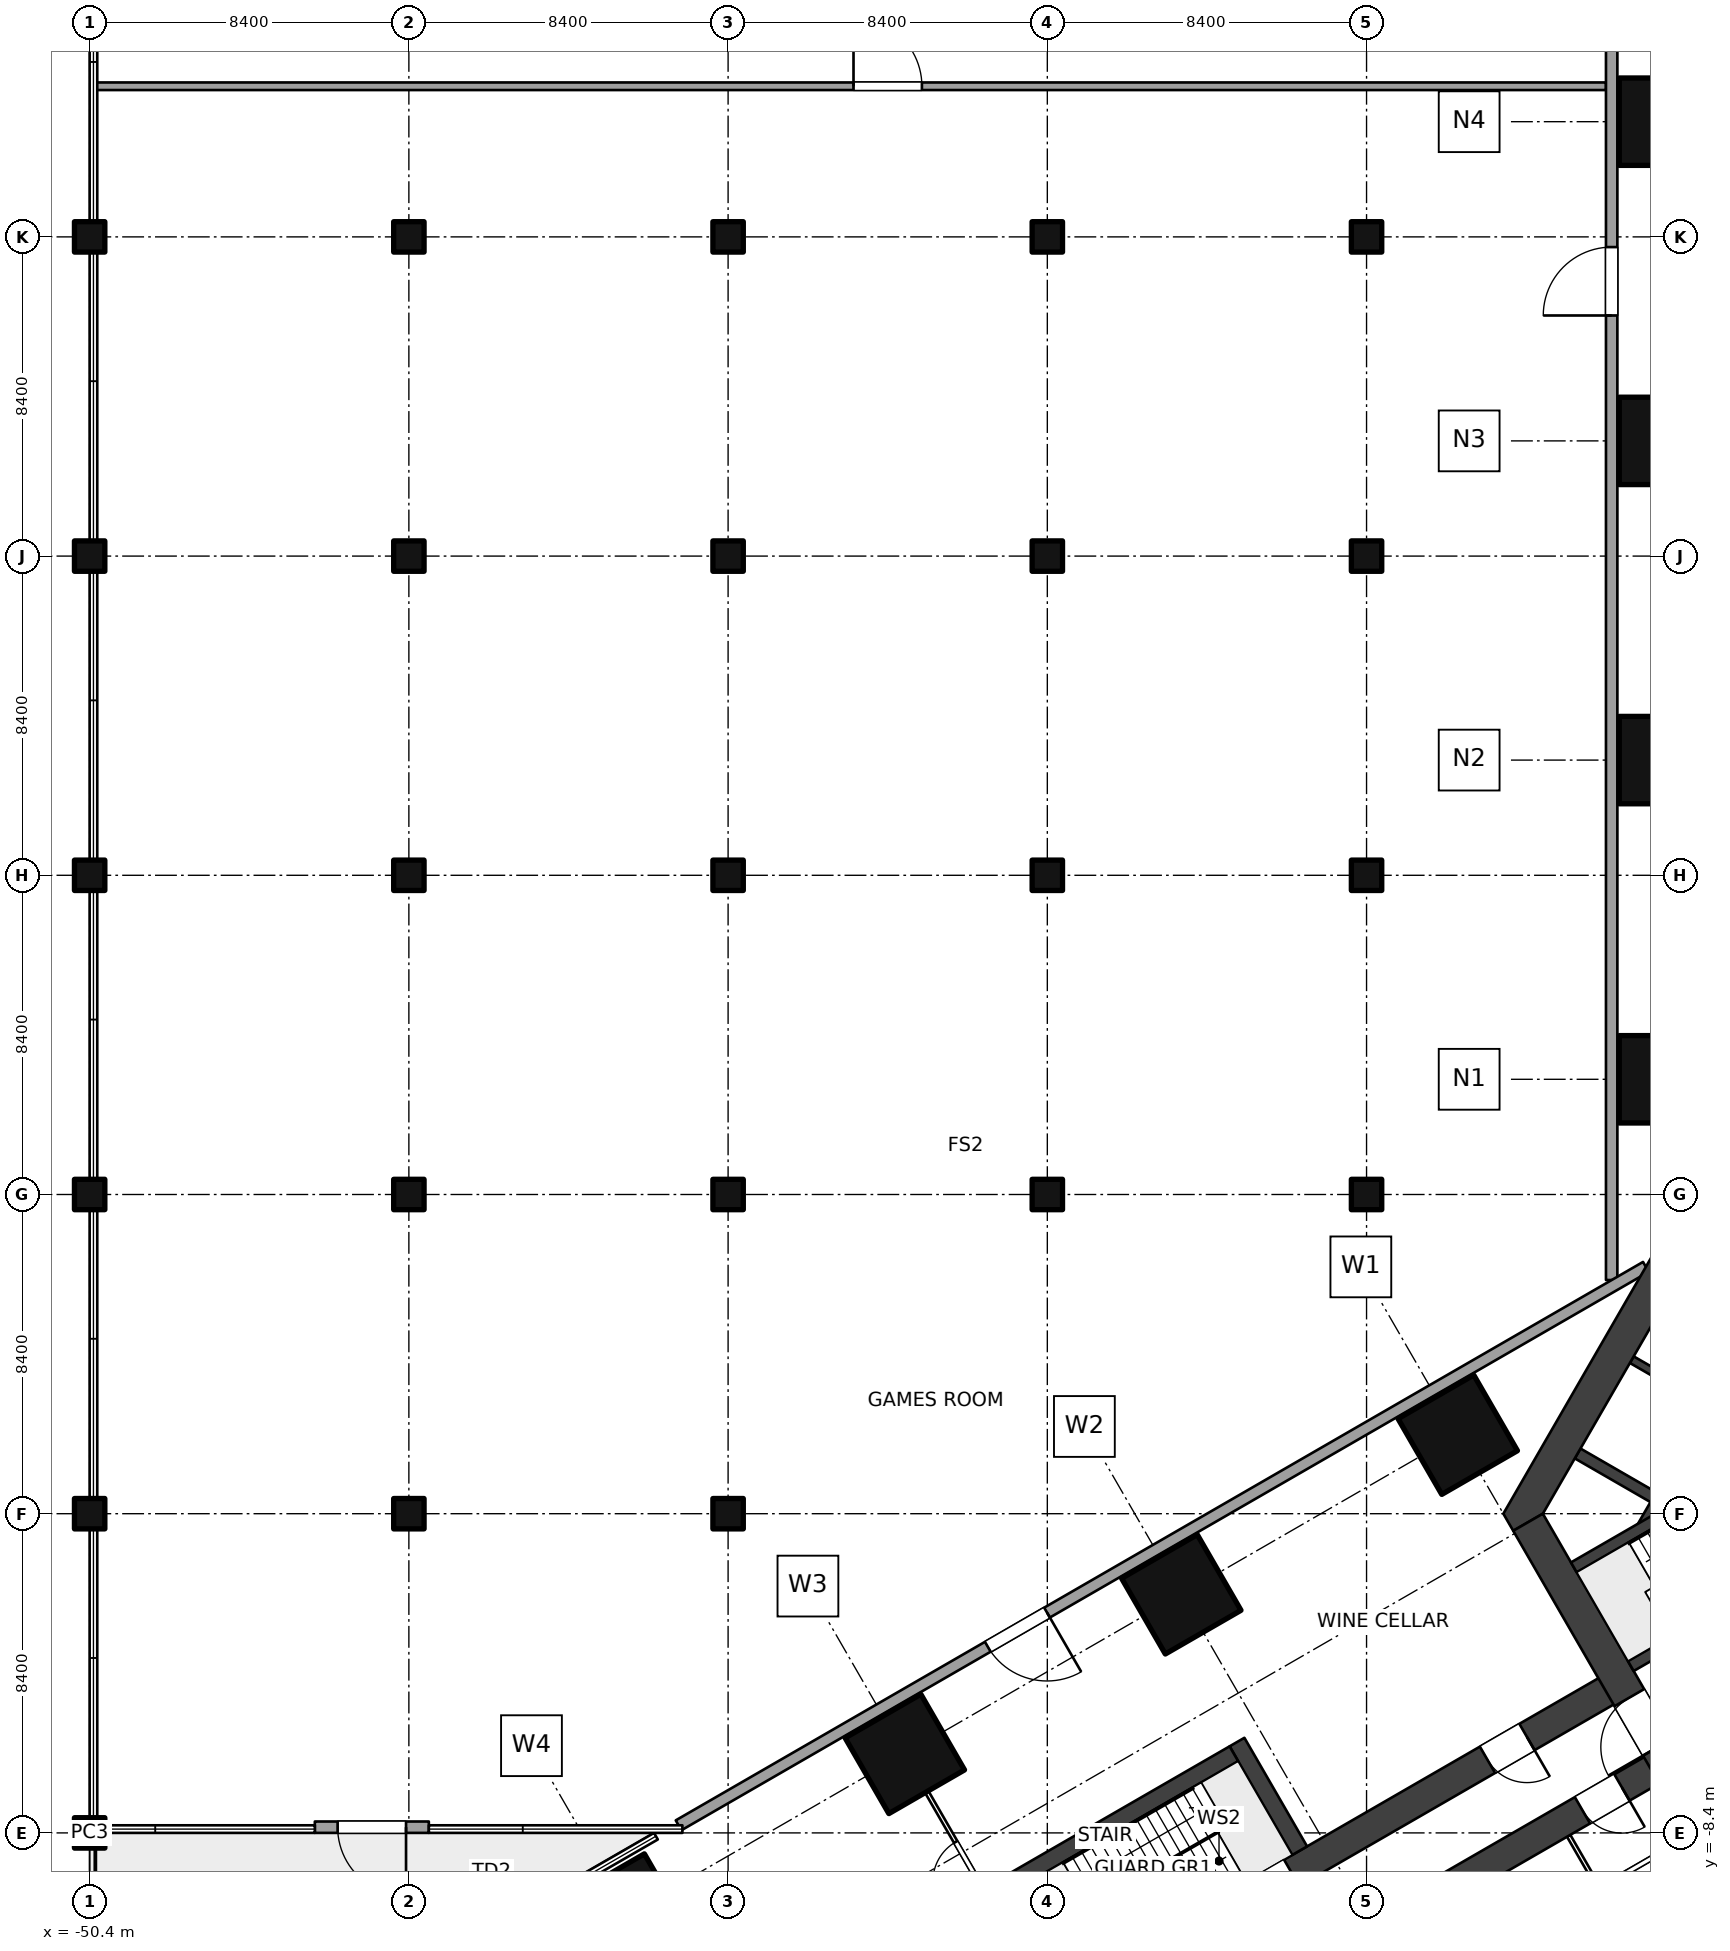
"""IFC4 building model, lengths in metres.
Left out: names, types, materials, properties, quantities, classifications, styles, units other than length and angle.
Written with IfcOpenShell. Run it as: python <this file> out.ifc"""

import sys

from ifc_helpers import new_model, si_unit, direction, frame, frame_2d, origin, origin_2d, place, context, subcontext, project, spatial, polyline, rectangle, outline, extrude, element, fill, save


model = new_model("IFC4")
c1 = context("Model", 3, precision=1e-05, world=origin(), true_north=direction((0.0, 1.0)))
c2 = subcontext(c1, "Body", "Model", "MODEL_VIEW")
j1 = project(units=[si_unit("LENGTHUNIT", "METRE"), si_unit("PLANEANGLEUNIT", "RADIAN")], contexts=[c1])
p1 = place(None, origin())
s1 = spatial("IfcSite", under=j1, at=p1, CompositionType="ELEMENT")
p2 = place(p1, origin())
s2 = spatial("IfcBuilding", under=s1, at=p2, CompositionType="ELEMENT")
p3 = place(p2, frame((0.0, 0.0, 21.0)))
s3 = spatial("IfcBuildingStorey", under=s2, at=p3, CompositionType="ELEMENT", Elevation=21.0)
for number, where, z_axis, x_axis in (
    (1, (-9.0, 11.432, 0.0), (0.0, 0.0, 1.0), (1.0, 0.0, 0.0)),
    (2, (-9.0, 19.832, 0.0), (0.0, 0.0, 1.0), (1.0, 0.0, 0.0)),
    (3, (-9.0, 28.231, 0.0), (0.0, 0.0, 1.0), (1.0, 0.0, 0.0)),
    (4, (-9.0, 36.632, 0.0), (0.0, 0.0, 1.0), (1.0, 0.0, 0.0)),
    (5, (-14.4, 2.078, 0.0), (0.0, 0.0, 1.0), (-0.5, 0.866, 0.0)),
    (6, (-21.675, -2.122, 0.0), (0.0, 0.0, 1.0), (-0.5, 0.866, 0.0)),
    (7, (-28.949, -6.322, 0.0), (0.0, 0.0, 1.0), (-0.5, 0.866, 0.0)),
    (8, (-36.224, -10.521, 0.0), (0.0, 0.0, 1.0), (-0.5, 0.866, 0.0)),
):
    element("IfcColumn", number, at=place(p3, frame(where, z_axis=z_axis, x_axis=x_axis)), inside=s3, PredefinedType="COLUMN", context=c2, shape_type="SweptSolid", body=[
        extrude(rectangle(XDim=2.3, YDim=2.3, at=origin_2d()), origin(), (0.0, 0.0, 1.0), 5.0),
    ])
for number, where, z_axis, x_axis in (
    (9, (-50.4, -8.4, 0.0), (0.0, 0.0, 1.0), (1.0, 0.0, 0.0)),
    (10, (-50.4, 0.0, 0.0), (0.0, 0.0, 1.0), (1.0, 0.0, 0.0)),
    (11, (-50.4, 8.4, 0.0), (0.0, 0.0, 1.0), (1.0, 0.0, 0.0)),
    (12, (-50.4, 16.8, 0.0), (0.0, 0.0, 1.0), (1.0, 0.0, 0.0)),
    (13, (-50.4, 25.2, 0.0), (0.0, 0.0, 1.0), (1.0, 0.0, 0.0)),
    (14, (-50.4, 33.6, 0.0), (0.0, 0.0, 1.0), (1.0, 0.0, 0.0)),
    (15, (-42.0, 0.0, 0.0), (0.0, 0.0, 1.0), (1.0, 0.0, 0.0)),
    (16, (-42.0, 8.4, 0.0), (0.0, 0.0, 1.0), (1.0, 0.0, 0.0)),
    (17, (-42.0, 16.8, 0.0), (0.0, 0.0, 1.0), (1.0, 0.0, 0.0)),
    (18, (-42.0, 25.2, 0.0), (0.0, 0.0, 1.0), (1.0, 0.0, 0.0)),
    (19, (-42.0, 33.6, 0.0), (0.0, 0.0, 1.0), (1.0, 0.0, 0.0)),
    (20, (-33.6, 0.0, 0.0), (0.0, 0.0, 1.0), (1.0, 0.0, 0.0)),
    (21, (-33.6, 8.4, 0.0), (0.0, 0.0, 1.0), (1.0, 0.0, 0.0)),
    (22, (-33.6, 16.8, 0.0), (0.0, 0.0, 1.0), (1.0, 0.0, 0.0)),
    (23, (-33.6, 25.2, 0.0), (0.0, 0.0, 1.0), (1.0, 0.0, 0.0)),
    (24, (-33.6, 33.6, 0.0), (0.0, 0.0, 1.0), (1.0, 0.0, 0.0)),
    (25, (-25.2, 8.4, 0.0), (0.0, 0.0, 1.0), (1.0, 0.0, 0.0)),
    (26, (-25.2, 16.8, 0.0), (0.0, 0.0, 1.0), (1.0, 0.0, 0.0)),
    (27, (-25.2, 25.2, 0.0), (0.0, 0.0, 1.0), (1.0, 0.0, 0.0)),
    (28, (-25.2, 33.6, 0.0), (0.0, 0.0, 1.0), (1.0, 0.0, 0.0)),
    (29, (-16.8, 8.4, 0.0), (0.0, 0.0, 1.0), (1.0, 0.0, 0.0)),
    (30, (-16.8, 16.8, 0.0), (0.0, 0.0, 1.0), (1.0, 0.0, 0.0)),
    (31, (-16.8, 25.2, 0.0), (0.0, 0.0, 1.0), (1.0, 0.0, 0.0)),
    (32, (-16.8, 33.6, 0.0), (0.0, 0.0, 1.0), (1.0, 0.0, 0.0)),
):
    element("IfcColumn", number, at=place(p3, frame(where, z_axis=z_axis, x_axis=x_axis)), inside=s3, PredefinedType="COLUMN", context=c2, shape_type="SweptSolid", body=[
        extrude(rectangle(XDim=0.8, YDim=0.8, at=origin_2d()), origin(), (0.0, 0.0, 1.0), 5.0),
    ])
p4 = place(p3, frame((-6.47, -10.757, 0.0), z_axis=(0.0, 0.0, 1.0), x_axis=(-0.499997612506, 0.8660267822, 0.0)))
e33 = element("IfcWall", 33, at=p4, inside=s3, PredefinedType="SHEAR", context=c2, shape_type="SweptSolid", body=[
    extrude(rectangle(XDim=12.161, YDim=0.9, at=frame_2d((6.08, 0.0))), origin(), (0.0, 0.0, 1.0), 5.0),
])
p5 = place(p4, frame((5.33, 0.0, 0.0)))
e34 = element("IfcOpeningElement", 34, at=p5, cuts=e33, PredefinedType="OPENING", context=c2, shape_type="SweptSolid", body=[
    extrude(rectangle(XDim=1.5, YDim=2.1, at=frame_2d((0.75, 1.05))), frame((0.0, 0.46, 0.0), z_axis=(0.0, -1.0, 0.0), x_axis=(1.0, 0.0, 0.0)), (0.0, 0.0, 1.0), 0.92),
])
p6 = place(p3, origin())
e35 = element("IfcWall", 35, at=p6, inside=s3, PredefinedType="SHEAR", context=c2, shape_type="SweptSolid", body=[
    extrude(outline(polyline([(-6.6, 11.432), (-13.2, 0.0), (-12.94, -0.45), (-12.161, 0.0), (-6.08, 10.531), (-6.08, 11.432), (-6.6, 11.432)])), origin(), (0.0, 0.0, 1.0), 5.0),
])
p7 = place(p3, frame((-3.869, -0.559, 0.0), z_axis=(0.0, 0.0, 1.0), x_axis=(-0.86602711848, -0.499997030048, 0.0)))
e36 = element("IfcWall", 36, at=p7, inside=s3, PredefinedType="SHEAR", context=c2, shape_type="SweptSolid", body=[
    extrude(rectangle(XDim=6.901, YDim=0.3, at=frame_2d((3.451, 0.0))), origin(), (0.0, 0.0, 1.0), 5.0),
])
p8 = place(p7, frame((0.25, 0.0, 0.0)))
e37 = element("IfcOpeningElement", 37, at=p8, cuts=e36, PredefinedType="OPENING", context=c2, shape_type="SweptSolid", body=[
    extrude(rectangle(XDim=1.0, YDim=2.1, at=frame_2d((0.5, 1.05))), frame((0.0, 0.16, 0.0), z_axis=(0.0, -1.0, 0.0), x_axis=(1.0, 0.0, 0.0)), (0.0, 0.0, 1.0), 0.32),
])
p9 = place(p3, frame((-5.369, 2.039, 0.0), z_axis=(0.0, 0.0, 1.0), x_axis=(-0.86602711848, -0.499997030048, 0.0)))
e38 = element("IfcWall", 38, at=p9, inside=s3, PredefinedType="SHEAR", context=c2, shape_type="SweptSolid", body=[
    extrude(rectangle(XDim=6.901, YDim=0.3, at=frame_2d((3.451, 0.0))), origin(), (0.0, 0.0, 1.0), 5.0),
])
p10 = place(p3, frame((-9.548, -0.374, 0.0), z_axis=(0.0, 0.0, 1.0), x_axis=(0.500002290144, 0.866024081565, 0.0)))
e39 = element("IfcWall", 39, at=p10, inside=s3, PredefinedType="SHEAR", context=c2, shape_type="SweptSolid", body=[
    extrude(rectangle(XDim=10.195, YDim=0.3, at=frame_2d((5.098, 0.0))), origin(), (0.0, 0.0, 1.0), 5.0),
])
p11 = place(p3, frame((-9.254, 0.435, 0.0), z_axis=(0.0, 0.0, 1.0), x_axis=(-0.866007057882, 0.500031774688, 0.0)))
e40 = element("IfcWall", 40, at=p11, inside=s3, PredefinedType="SHEAR", context=c2, shape_type="SweptSolid", body=[
    extrude(rectangle(XDim=2.3, YDim=0.3, at=frame_2d((1.15, 0.0))), origin(), (0.0, 0.0, 1.0), 5.0),
])
p12 = place(p3, frame((-7.829, 2.903, 0.0), z_axis=(0.0, 0.0, 1.0), x_axis=(-0.866053019151, 0.499952165731, 0.0)))
e41 = element("IfcWall", 41, at=p12, inside=s3, PredefinedType="SHEAR", context=c2, shape_type="SweptSolid", body=[
    extrude(rectangle(XDim=2.3, YDim=0.2, at=frame_2d((1.15, 0.0))), origin(), (0.0, 0.0, 1.0), 5.0),
])
p13 = place(p3, frame((-8.91, -6.53, 0.0), z_axis=(0.0, 0.0, 1.0), x_axis=(-0.866026214035, -0.499998596603, 0.0)))
e42 = element("IfcWall", 42, at=p13, inside=s3, PredefinedType="SHEAR", context=c2, shape_type="SweptSolid", body=[
    extrude(rectangle(XDim=36.888, YDim=0.8, at=frame_2d((18.444, 0.0))), origin(), (0.0, 0.0, 1.0), 5.0),
])
p14 = place(p13, frame((1.35, 0.0, 0.0)))
e43 = element("IfcOpeningElement", 43, at=p14, cuts=e42, PredefinedType="OPENING", context=c2, shape_type="SweptSolid", body=[
    extrude(rectangle(XDim=1.2, YDim=2.1, at=frame_2d((0.6, 1.05))), frame((0.0, 0.41, 0.0), z_axis=(0.0, -1.0, 0.0), x_axis=(1.0, 0.0, 0.0)), (0.0, 0.0, 1.0), 0.82),
])
p15 = place(p3, frame((-10.11, -4.451, 0.0), z_axis=(0.0, 0.0, 1.0), x_axis=(-0.866023348156, -0.500003560437, 0.0)))
e44 = element("IfcWall", 44, at=p15, inside=s3, PredefinedType="SHEAR", context=c2, shape_type="SweptSolid", body=[
    extrude(rectangle(XDim=36.888, YDim=0.8, at=frame_2d((18.444, 0.0))), origin(), (0.0, 0.0, 1.0), 5.0),
])
p16 = place(p15, frame((10.0, 0.0, 0.0)))
e45 = element("IfcOpeningElement", 45, at=p16, cuts=e44, PredefinedType="OPENING", context=c2, shape_type="SweptSolid", body=[
    extrude(rectangle(XDim=1.0, YDim=2.1, at=frame_2d((0.5, 1.05))), frame((0.0, 0.41, 0.0), z_axis=(0.0, -1.0, 0.0), x_axis=(1.0, 0.0, 0.0)), (0.0, 0.0, 1.0), 0.82),
])
p17 = place(p15, frame((2.85, 0.0, 0.0)))
e46 = element("IfcOpeningElement", 46, at=p17, cuts=e44, PredefinedType="OPENING", context=c2, shape_type="SweptSolid", body=[
    extrude(rectangle(XDim=1.2, YDim=2.1, at=frame_2d((0.6, 1.05))), frame((0.0, 0.41, 0.0), z_axis=(0.0, -1.0, 0.0), x_axis=(1.0, 0.0, 0.0)), (0.0, 0.0, 1.0), 0.82),
])
p18 = place(p3, frame((-41.475, -8.25, 0.0), z_axis=(0.0, 0.0, 1.0), x_axis=(-1.0, 0.0, 0.0)))
e47 = element("IfcWall", 47, at=p18, inside=s3, PredefinedType="SOLIDWALL", context=c2, shape_type="SweptSolid", body=[
    extrude(rectangle(XDim=3.0, YDim=0.3, at=frame_2d((1.5, 0.0))), origin(), (0.0, 0.0, 1.0), 4.6),
])
p19 = place(p18, frame((0.6, 0.0, 0.0)))
e48 = element("IfcOpeningElement", 48, at=p19, cuts=e47, PredefinedType="OPENING", context=c2, shape_type="SweptSolid", body=[
    extrude(rectangle(XDim=1.8, YDim=2.4, at=frame_2d((0.9, 1.2))), frame((0.0, 0.16, 0.0), z_axis=(0.0, -1.0, 0.0), x_axis=(1.0, 0.0, 0.0)), (0.0, 0.0, 1.0), 0.32),
])
p20 = place(p3, frame((-8.3, -8.487, 0.0), z_axis=(0.0, 0.0, 1.0), x_axis=(-0.866034573852, -0.49998411664, 0.0)))
e49 = element("IfcWall", 49, at=p20, inside=s3, PredefinedType="PARTITIONING", context=c2, shape_type="SweptSolid", body=[
    extrude(rectangle(XDim=2.8, YDim=0.1, at=frame_2d((1.4, 0.0))), origin(), (0.0, 0.0, 1.0), 4.6),
])
p21 = place(p20, frame((0.9, 0.0, 0.0)))
e50 = element("IfcOpeningElement", 50, at=p21, cuts=e49, PredefinedType="OPENING", context=c2, shape_type="SweptSolid", body=[
    extrude(rectangle(XDim=1.2, YDim=2.1, at=frame_2d((0.6, 1.05))), frame((0.0, 0.06, 0.0), z_axis=(0.0, -1.0, 0.0), x_axis=(1.0, 0.0, 0.0)), (0.0, 0.0, 1.0), 0.12),
])
p22 = place(p3, frame((-11.482, -8.476, 0.0), z_axis=(0.0, 0.0, 1.0), x_axis=(0.500017819788, -0.86601511528, 0.0)))
e51 = element("IfcWall", 51, at=p22, inside=s3, PredefinedType="PARTITIONING", context=c2, shape_type="SweptSolid", body=[
    extrude(rectangle(XDim=1.55, YDim=0.1, at=frame_2d((0.775, 0.0))), origin(), (0.0, 0.0, 1.0), 4.6),
])
p23 = place(p3, frame((-25.249, -12.73, 0.0), z_axis=(0.0, 0.0, 1.0), x_axis=(-0.499987320047, 0.866032724435, 0.0)))
e52 = element("IfcWall", 52, at=p23, inside=s3, PredefinedType="PARTITIONING", context=c2, shape_type="SweptSolid", body=[
    extrude(rectangle(XDim=6.25, YDim=0.1, at=frame_2d((3.125, 0.0))), origin(), (0.0, 0.0, 1.0), 2.8),
])
p24 = place(p23, frame((3.525, 0.0, 0.0)))
e53 = element("IfcOpeningElement", 53, at=p24, cuts=e52, PredefinedType="OPENING", context=c2, shape_type="SweptSolid", body=[
    extrude(rectangle(XDim=1.2, YDim=2.1, at=frame_2d((0.6, 1.05))), frame((0.0, 0.06, 0.0), z_axis=(0.0, -1.0, 0.0), x_axis=(1.0, 0.0, 0.0)), (0.0, 0.0, 1.0), 0.12),
])
p25 = place(p3, frame((-50.237, 37.564, 0.0), z_axis=(0.0, 0.0, 1.0), x_axis=(1.0, 0.0, 0.0)))
e54 = element("IfcWall", 54, at=p25, inside=s3, PredefinedType="SOLIDWALL", context=c2, shape_type="SweptSolid", body=[
    extrude(rectangle(XDim=39.737, YDim=0.2, at=frame_2d((19.869, 0.0))), origin(), (0.0, 0.0, 1.0), 4.6),
])
p26 = place(p25, frame((19.937, 0.0, 0.0)))
e55 = element("IfcOpeningElement", 55, at=p26, cuts=e54, PredefinedType="OPENING", context=c2, shape_type="SweptSolid", body=[
    extrude(rectangle(XDim=1.8, YDim=2.4, at=frame_2d((0.9, 1.2))), frame((0.0, 0.11, 0.0), z_axis=(0.0, -1.0, 0.0), x_axis=(1.0, 0.0, 0.0)), (0.0, 0.0, 1.0), 0.22),
])
p27 = place(p3, frame((-10.35, 6.149, 0.0), z_axis=(0.0, 0.0, 1.0), x_axis=(0.0, 1.0, 0.0)))
e56 = element("IfcWall", 56, at=p27, inside=s3, PredefinedType="SOLIDWALL", context=c2, shape_type="SweptSolid", body=[
    extrude(rectangle(XDim=41.883, YDim=0.3, at=frame_2d((20.941, 0.0))), origin(), (0.0, 0.0, 1.0), 4.6),
])
p28 = place(p27, frame((25.383, 0.0, 0.0)))
e57 = element("IfcOpeningElement", 57, at=p28, cuts=e56, PredefinedType="OPENING", context=c2, shape_type="SweptSolid", body=[
    extrude(rectangle(XDim=1.8, YDim=2.4, at=frame_2d((0.9, 1.2))), frame((0.0, 0.16, 0.0), z_axis=(0.0, -1.0, 0.0), x_axis=(1.0, 0.0, 0.0)), (0.0, 0.0, 1.0), 0.32),
])
p29 = place(p3, frame((-9.45, 6.495, 0.0), z_axis=(0.0, 0.0, 1.0), x_axis=(-0.866027750123, -0.499995936, 0.0)))
e58 = element("IfcWall", 58, at=p29, inside=s3, PredefinedType="SOLIDWALL", context=c2, shape_type="SweptSolid", body=[
    extrude(rectangle(XDim=29.39, YDim=0.3, at=frame_2d((14.695, 0.0))), origin(), (0.0, 0.0, 1.0), 4.6),
])
p30 = place(p29, frame((18.195, 0.0, 0.0)))
e59 = element("IfcOpeningElement", 59, at=p30, cuts=e58, PredefinedType="OPENING", context=c2, shape_type="SweptSolid", body=[
    extrude(rectangle(XDim=1.8, YDim=2.4, at=frame_2d((0.9, 1.2))), frame((0.0, 0.16, 0.0), z_axis=(0.0, -1.0, 0.0), x_axis=(1.0, 0.0, 0.0)), (0.0, 0.0, 1.0), 0.32),
])
p31 = place(p3, frame((-18.559, -8.868, 0.0), z_axis=(0.0, 0.0, 1.0), x_axis=(-0.50002983664, 0.866008176907, 0.0)))
e60 = element("IfcWall", 60, at=p31, inside=s3, PredefinedType="SOLIDWALL", context=c2, shape_type="SweptSolid", body=[
    extrude(rectangle(XDim=3.3, YDim=0.45, at=frame_2d((1.65, 0.0))), origin(), (0.0, 0.0, 1.0), 5.0),
])
p32 = place(p3, frame((-20.292, -6.317, 0.0), z_axis=(0.0, 0.0, 1.0), x_axis=(-0.866028853923, -0.499994024137, 0.0)))
e61 = element("IfcWall", 61, at=p32, inside=s3, PredefinedType="SOLIDWALL", context=c2, shape_type="SweptSolid", body=[
    extrude(rectangle(XDim=6.9, YDim=0.45, at=frame_2d((3.45, 0.0))), origin(), (0.0, 0.0, 1.0), 5.0),
])
p33 = place(p19, origin())
e62 = element("IfcDoor", 62, at=p33, inside=s3, OperationType="DOUBLE_DOOR_SINGLE_SWING", PredefinedType="DOOR", context=c2, shape_type="SweptSolid", body=[
    extrude(rectangle(XDim=1.8, YDim=2.4, at=frame_2d((0.9, 1.2))), frame((0.0, 0.025, 0.0), z_axis=(0.0, -1.0, 0.0), x_axis=(1.0, 0.0, 0.0)), (0.0, 0.0, 1.0), 0.05),
])
fill(e48, e62)
p34 = place(p5, origin())
e63 = element("IfcDoor", 63, at=p34, inside=s3, OperationType="DOUBLE_DOOR_DOUBLE_SWING", PredefinedType="DOOR", context=c2, shape_type="SweptSolid", body=[
    extrude(rectangle(XDim=1.5, YDim=2.1, at=frame_2d((0.75, 1.05))), frame((0.0, 0.025, 0.0), z_axis=(0.0, -1.0, 0.0), x_axis=(1.0, 0.0, 0.0)), (0.0, 0.0, 1.0), 0.05),
])
fill(e34, e63)
p35 = place(p14, origin())
e64 = element("IfcDoor", 64, at=p35, inside=s3, OperationType="DOUBLE_SWING_LEFT", PredefinedType="DOOR", context=c2, shape_type="SweptSolid", body=[
    extrude(rectangle(XDim=1.2, YDim=2.1, at=frame_2d((0.6, 1.05))), frame((0.0, 0.025, 0.0), z_axis=(0.0, -1.0, 0.0), x_axis=(1.0, 0.0, 0.0)), (0.0, 0.0, 1.0), 0.05),
])
fill(e43, e64)
p36 = place(p21, origin())
e65 = element("IfcDoor", 65, at=p36, inside=s3, OperationType="DOUBLE_SWING_LEFT", PredefinedType="DOOR", context=c2, shape_type="SweptSolid", body=[
    extrude(rectangle(XDim=1.2, YDim=2.1, at=frame_2d((0.6, 1.05))), frame((0.0, 0.025, 0.0), z_axis=(0.0, -1.0, 0.0), x_axis=(1.0, 0.0, 0.0)), (0.0, 0.0, 1.0), 0.05),
])
fill(e50, e65)
p37 = place(p24, origin())
e66 = element("IfcDoor", 66, at=p37, inside=s3, OperationType="DOUBLE_SWING_LEFT", PredefinedType="DOOR", context=c2, shape_type="SweptSolid", body=[
    extrude(rectangle(XDim=1.2, YDim=2.1, at=frame_2d((0.6, 1.05))), frame((0.0, 0.025, 0.0), z_axis=(0.0, -1.0, 0.0), x_axis=(1.0, 0.0, 0.0)), (0.0, 0.0, 1.0), 0.05),
])
fill(e53, e66)
p38 = place(p17, origin())
e67 = element("IfcDoor", 67, at=p38, inside=s3, OperationType="DOUBLE_SWING_LEFT", PredefinedType="DOOR", context=c2, shape_type="SweptSolid", body=[
    extrude(rectangle(XDim=1.2, YDim=2.1, at=frame_2d((0.6, 1.05))), frame((0.0, 0.025, 0.0), z_axis=(0.0, -1.0, 0.0), x_axis=(1.0, 0.0, 0.0)), (0.0, 0.0, 1.0), 0.05),
])
fill(e46, e67)
p39 = place(p26, origin())
e68 = element("IfcDoor", 68, at=p39, inside=s3, OperationType="DOUBLE_DOOR_DOUBLE_SWING", PredefinedType="DOOR", context=c2, shape_type="SweptSolid", body=[
    extrude(rectangle(XDim=1.8, YDim=2.4, at=frame_2d((0.9, 1.2))), frame((0.0, 0.025, 0.0), z_axis=(0.0, -1.0, 0.0), x_axis=(1.0, 0.0, 0.0)), (0.0, 0.0, 1.0), 0.05),
])
fill(e55, e68)
p40 = place(p28, origin())
e69 = element("IfcDoor", 69, at=p40, inside=s3, OperationType="DOUBLE_DOOR_DOUBLE_SWING", PredefinedType="DOOR", context=c2, shape_type="SweptSolid", body=[
    extrude(rectangle(XDim=1.8, YDim=2.4, at=frame_2d((0.9, 1.2))), frame((0.0, 0.025, 0.0), z_axis=(0.0, -1.0, 0.0), x_axis=(1.0, 0.0, 0.0)), (0.0, 0.0, 1.0), 0.05),
])
fill(e57, e69)
p41 = place(p30, origin())
e70 = element("IfcDoor", 70, at=p41, inside=s3, OperationType="DOUBLE_DOOR_DOUBLE_SWING", PredefinedType="DOOR", context=c2, shape_type="SweptSolid", body=[
    extrude(rectangle(XDim=1.8, YDim=2.4, at=frame_2d((0.9, 1.2))), frame((0.0, 0.025, 0.0), z_axis=(0.0, -1.0, 0.0), x_axis=(1.0, 0.0, 0.0)), (0.0, 0.0, 1.0), 0.05),
])
fill(e59, e70)
save(model, sys.argv[1])
